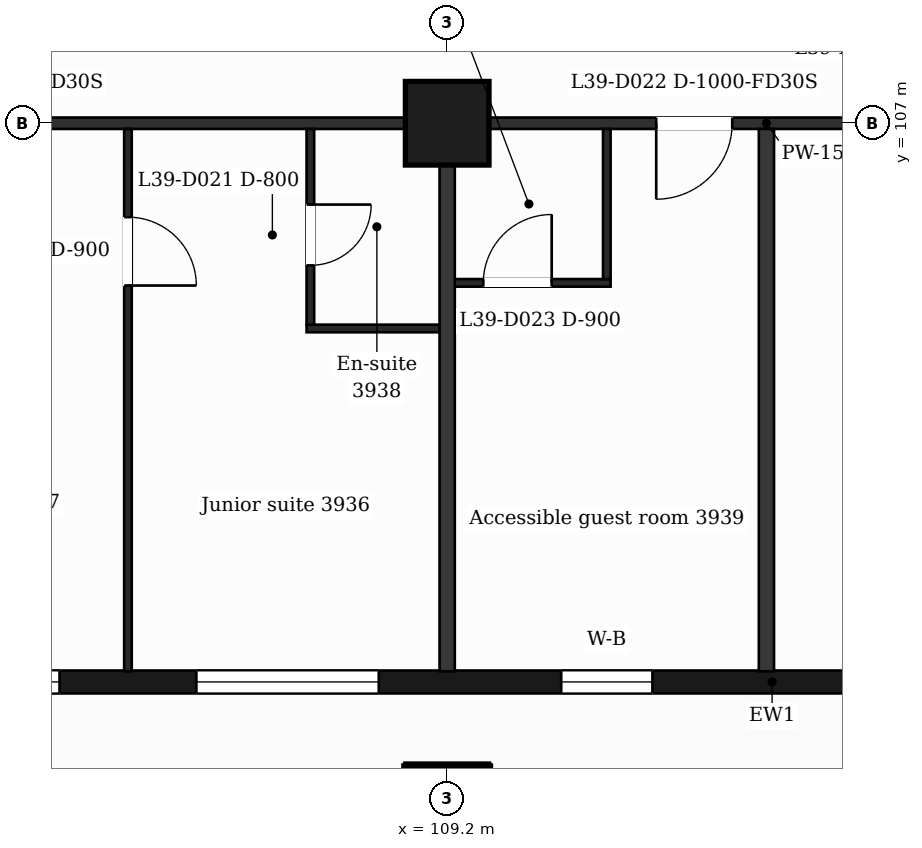
"""IFC4 building model, lengths in metres.
Left out: names, types, materials, properties, quantities, classifications, styles, units other than length and angle.
Written with IfcOpenShell. Run it as: python <this file> out.ifc"""

import sys

from ifc_helpers import new_model, si_unit, direction, frame, frame_2d, origin, origin_2d, place, context, subcontext, project, spatial, rectangle, extrude, element, fill, save


model = new_model("IFC4")
c1 = context("Model", 3, precision=1e-05, world=origin(), true_north=direction((0.0, 1.0)))
c2 = subcontext(c1, "Body", "Model", "MODEL_VIEW")
j1 = project(units=[si_unit("LENGTHUNIT", "METRE"), si_unit("PLANEANGLEUNIT", "RADIAN")], contexts=[c1])
p1 = place(None, origin())
s1 = spatial("IfcSite", under=j1, at=p1, CompositionType="ELEMENT")
p2 = place(p1, origin())
s2 = spatial("IfcBuilding", under=s1, at=p2, CompositionType="ELEMENT")
p3 = place(p2, frame((0.0, 0.0, 166.3)))
s3 = spatial("IfcBuildingStorey", under=s2, at=p3, CompositionType="ELEMENT", Elevation=166.3)
for number, where, z_axis, x_axis in (
    (1, (109.2, 98.0, 0.0), (0.0, 0.0, 1.0), (1.0, 0.0, 0.0)),
    (2, (109.2, 107.0, 0.0), (0.0, 0.0, 1.0), (1.0, 0.0, 0.0)),
):
    element("IfcColumn", number, at=place(p3, frame(where, z_axis=z_axis, x_axis=x_axis)), inside=s3, PredefinedType="COLUMN", context=c2, shape_type="SweptSolid", body=[
        extrude(rectangle(XDim=1.1, YDim=1.1, at=origin_2d()), origin(), (0.0, 0.0, 1.0), 3.7),
    ])
p4 = place(p3, frame((89.85, 99.65, 0.0), z_axis=(0.0, 0.0, 1.0), x_axis=(1.0, 0.0, 0.0)))
e3 = element("IfcWall", 3, at=p4, inside=s3, PredefinedType="SOLIDWALL", context=c2, shape_type="SweptSolid", body=[
    extrude(rectangle(XDim=47.25, YDim=0.3, at=frame_2d((23.625, 0.0))), origin(), (0.0, 0.0, 1.0), 3.38),
])
p5 = place(p4, frame((0.725, 0.0, 0.9)))
e4 = element("IfcOpeningElement", 4, at=p5, cuts=e3, PredefinedType="OPENING", context=c2, shape_type="SweptSolid", body=[
    extrude(rectangle(XDim=1.2, YDim=2.1, at=frame_2d((0.6, 1.05))), frame((0.0, 0.16, 0.0), z_axis=(0.0, -1.0, 0.0), x_axis=(1.0, 0.0, 0.0)), (0.0, 0.0, 1.0), 0.32),
])
p6 = place(p4, frame((3.45, 0.0, 0.9)))
e5 = element("IfcOpeningElement", 5, at=p6, cuts=e3, PredefinedType="OPENING", context=c2, shape_type="SweptSolid", body=[
    extrude(rectangle(XDim=2.4, YDim=2.1, at=frame_2d((1.2, 1.05))), frame((0.0, 0.16, 0.0), z_axis=(0.0, -1.0, 0.0), x_axis=(1.0, 0.0, 0.0)), (0.0, 0.0, 1.0), 0.32),
])
p7 = place(p4, frame((7.35, 0.0, 0.0)))
e6 = element("IfcOpeningElement", 6, at=p7, cuts=e3, PredefinedType="OPENING", context=c2, shape_type="SweptSolid", body=[
    extrude(rectangle(XDim=1.2, YDim=2.4, at=frame_2d((0.6, 1.2))), frame((0.0, 0.16, 0.0), z_axis=(0.0, -1.0, 0.0), x_axis=(1.0, 0.0, 0.0)), (0.0, 0.0, 1.0), 0.32),
])
p8 = place(p4, frame((9.15, 0.0, 0.9)))
e7 = element("IfcOpeningElement", 7, at=p8, cuts=e3, PredefinedType="OPENING", context=c2, shape_type="SweptSolid", body=[
    extrude(rectangle(XDim=1.2, YDim=2.1, at=frame_2d((0.6, 1.05))), frame((0.0, 0.16, 0.0), z_axis=(0.0, -1.0, 0.0), x_axis=(1.0, 0.0, 0.0)), (0.0, 0.0, 1.0), 0.32),
])
p9 = place(p4, frame((11.85, 0.0, 0.9)))
e8 = element("IfcOpeningElement", 8, at=p9, cuts=e3, PredefinedType="OPENING", context=c2, shape_type="SweptSolid", body=[
    extrude(rectangle(XDim=2.4, YDim=2.1, at=frame_2d((1.2, 1.05))), frame((0.0, 0.16, 0.0), z_axis=(0.0, -1.0, 0.0), x_axis=(1.0, 0.0, 0.0)), (0.0, 0.0, 1.0), 0.32),
])
p10 = place(p4, frame((16.05, 0.0, 0.9)))
e9 = element("IfcOpeningElement", 9, at=p10, cuts=e3, PredefinedType="OPENING", context=c2, shape_type="SweptSolid", body=[
    extrude(rectangle(XDim=2.4, YDim=2.1, at=frame_2d((1.2, 1.05))), frame((0.0, 0.16, 0.0), z_axis=(0.0, -1.0, 0.0), x_axis=(1.0, 0.0, 0.0)), (0.0, 0.0, 1.0), 0.32),
])
p11 = place(p4, frame((20.85, 0.0, 0.9)))
e10 = element("IfcOpeningElement", 10, at=p11, cuts=e3, PredefinedType="OPENING", context=c2, shape_type="SweptSolid", body=[
    extrude(rectangle(XDim=1.2, YDim=2.1, at=frame_2d((0.6, 1.05))), frame((0.0, 0.16, 0.0), z_axis=(0.0, -1.0, 0.0), x_axis=(1.0, 0.0, 0.0)), (0.0, 0.0, 1.0), 0.32),
])
p12 = place(p4, frame((25.05, 0.0, 0.9)))
e11 = element("IfcOpeningElement", 11, at=p12, cuts=e3, PredefinedType="OPENING", context=c2, shape_type="SweptSolid", body=[
    extrude(rectangle(XDim=1.2, YDim=2.1, at=frame_2d((0.6, 1.05))), frame((0.0, 0.16, 0.0), z_axis=(0.0, -1.0, 0.0), x_axis=(1.0, 0.0, 0.0)), (0.0, 0.0, 1.0), 0.32),
])
p13 = place(p4, frame((28.65, 0.0, 0.9)))
e12 = element("IfcOpeningElement", 12, at=p13, cuts=e3, PredefinedType="OPENING", context=c2, shape_type="SweptSolid", body=[
    extrude(rectangle(XDim=2.4, YDim=2.1, at=frame_2d((1.2, 1.05))), frame((0.0, 0.16, 0.0), z_axis=(0.0, -1.0, 0.0), x_axis=(1.0, 0.0, 0.0)), (0.0, 0.0, 1.0), 0.32),
])
p14 = place(p4, frame((32.85, 0.0, 0.9)))
e13 = element("IfcOpeningElement", 13, at=p14, cuts=e3, PredefinedType="OPENING", context=c2, shape_type="SweptSolid", body=[
    extrude(rectangle(XDim=2.4, YDim=2.1, at=frame_2d((1.2, 1.05))), frame((0.0, 0.16, 0.0), z_axis=(0.0, -1.0, 0.0), x_axis=(1.0, 0.0, 0.0)), (0.0, 0.0, 1.0), 0.32),
])
p15 = place(p4, frame((37.05, 0.0, 0.9)))
e14 = element("IfcOpeningElement", 14, at=p15, cuts=e3, PredefinedType="OPENING", context=c2, shape_type="SweptSolid", body=[
    extrude(rectangle(XDim=2.4, YDim=2.1, at=frame_2d((1.2, 1.05))), frame((0.0, 0.16, 0.0), z_axis=(0.0, -1.0, 0.0), x_axis=(1.0, 0.0, 0.0)), (0.0, 0.0, 1.0), 0.32),
])
p16 = place(p4, frame((41.25, 0.0, 0.9)))
e15 = element("IfcOpeningElement", 15, at=p16, cuts=e3, PredefinedType="OPENING", context=c2, shape_type="SweptSolid", body=[
    extrude(rectangle(XDim=2.4, YDim=2.1, at=frame_2d((1.2, 1.05))), frame((0.0, 0.16, 0.0), z_axis=(0.0, -1.0, 0.0), x_axis=(1.0, 0.0, 0.0)), (0.0, 0.0, 1.0), 0.32),
])
p17 = place(p4, frame((45.25, 0.0, 0.9)))
e16 = element("IfcOpeningElement", 16, at=p17, cuts=e3, PredefinedType="OPENING", context=c2, shape_type="SweptSolid", body=[
    extrude(rectangle(XDim=1.2, YDim=2.1, at=frame_2d((0.6, 1.05))), frame((0.0, 0.16, 0.0), z_axis=(0.0, -1.0, 0.0), x_axis=(1.0, 0.0, 0.0)), (0.0, 0.0, 1.0), 0.32),
])
p18 = place(p3, frame((107.35, 104.3, 0.0), z_axis=(0.0, 0.0, 1.0), x_axis=(1.0, 0.0, 0.0)))
e17 = element("IfcWall", 17, at=p18, inside=s3, PredefinedType="PARTITIONING", context=c2, shape_type="SweptSolid", body=[
    extrude(rectangle(XDim=1.85, YDim=0.1, at=frame_2d((0.925, 0.0))), origin(), (0.0, 0.0, 1.0), 3.38),
])
p19 = place(p3, frame((109.2, 104.9, 0.0), z_axis=(0.0, 0.0, 1.0), x_axis=(1.0, 0.0, 0.0)))
e18 = element("IfcWall", 18, at=p19, inside=s3, PredefinedType="PARTITIONING", context=c2, shape_type="SweptSolid", body=[
    extrude(rectangle(XDim=2.15, YDim=0.1, at=frame_2d((1.075, 0.0))), origin(), (0.0, 0.0, 1.0), 3.38),
])
p20 = place(p19, frame((0.475, 0.0, 0.0)))
e19 = element("IfcOpeningElement", 19, at=p20, cuts=e18, PredefinedType="OPENING", context=c2, shape_type="SweptSolid", body=[
    extrude(rectangle(XDim=0.9, YDim=2.1, at=frame_2d((0.45, 1.05))), frame((0.0, 0.06, 0.0), z_axis=(0.0, -1.0, 0.0), x_axis=(1.0, 0.0, 0.0)), (0.0, 0.0, 1.0), 0.12),
])
p21 = place(p3, frame((87.018, 107.0, 0.0), z_axis=(0.0, 0.0, 1.0), x_axis=(1.0, 0.0, 0.0)))
e20 = element("IfcWall", 20, at=p21, inside=s3, PredefinedType="PARTITIONING", context=c2, shape_type="SweptSolid", body=[
    extrude(rectangle(XDim=52.765, YDim=0.15, at=frame_2d((26.382, 0.0))), origin(), (0.0, 0.0, 1.0), 3.38),
])
p22 = place(p21, frame((0.463, 0.0, 0.0)))
e21 = element("IfcOpeningElement", 21, at=p22, cuts=e20, PredefinedType="OPENING", context=c2, shape_type="SweptSolid", body=[
    extrude(rectangle(XDim=0.95, YDim=2.1, at=frame_2d((0.475, 1.05))), frame((0.0, 0.085, 0.0), z_axis=(0.0, -1.0, 0.0), x_axis=(1.0, 0.0, 0.0)), (0.0, 0.0, 1.0), 0.17),
])
p23 = place(p21, frame((6.369, 0.0, 0.0)))
e22 = element("IfcOpeningElement", 22, at=p23, cuts=e20, PredefinedType="OPENING", context=c2, shape_type="SweptSolid", body=[
    extrude(rectangle(XDim=0.95, YDim=2.1, at=frame_2d((0.475, 1.05))), frame((0.0, 0.085, 0.0), z_axis=(0.0, -1.0, 0.0), x_axis=(1.0, 0.0, 0.0)), (0.0, 0.0, 1.0), 0.17),
])
p24 = place(p21, frame((9.857, 0.0, 0.0)))
e23 = element("IfcOpeningElement", 23, at=p24, cuts=e20, PredefinedType="OPENING", context=c2, shape_type="SweptSolid", body=[
    extrude(rectangle(XDim=0.95, YDim=2.1, at=frame_2d((0.475, 1.05))), frame((0.0, 0.085, 0.0), z_axis=(0.0, -1.0, 0.0), x_axis=(1.0, 0.0, 0.0)), (0.0, 0.0, 1.0), 0.17),
])
p25 = place(p21, frame((15.382, 0.0, 0.0)))
e24 = element("IfcOpeningElement", 24, at=p25, cuts=e20, PredefinedType="OPENING", context=c2, shape_type="SweptSolid", body=[
    extrude(rectangle(XDim=1.0, YDim=2.1, at=frame_2d((0.5, 1.05))), frame((0.0, 0.085, 0.0), z_axis=(0.0, -1.0, 0.0), x_axis=(1.0, 0.0, 0.0)), (0.0, 0.0, 1.0), 0.17),
])
p26 = place(p21, frame((24.932, 0.0, 0.0)))
e25 = element("IfcOpeningElement", 25, at=p26, cuts=e20, PredefinedType="OPENING", context=c2, shape_type="SweptSolid", body=[
    extrude(rectangle(XDim=1.0, YDim=2.1, at=frame_2d((0.5, 1.05))), frame((0.0, 0.085, 0.0), z_axis=(0.0, -1.0, 0.0), x_axis=(1.0, 0.0, 0.0)), (0.0, 0.0, 1.0), 0.17),
])
p27 = place(p21, frame((27.819, 0.0, 0.0)))
e26 = element("IfcOpeningElement", 26, at=p27, cuts=e20, PredefinedType="OPENING", context=c2, shape_type="SweptSolid", body=[
    extrude(rectangle(XDim=0.95, YDim=2.1, at=frame_2d((0.475, 1.05))), frame((0.0, 0.085, 0.0), z_axis=(0.0, -1.0, 0.0), x_axis=(1.0, 0.0, 0.0)), (0.0, 0.0, 1.0), 0.17),
])
p28 = place(p21, frame((42.012, 0.0, 0.0)))
e27 = element("IfcOpeningElement", 27, at=p28, cuts=e20, PredefinedType="OPENING", context=c2, shape_type="SweptSolid", body=[
    extrude(rectangle(XDim=1.0, YDim=2.1, at=frame_2d((0.5, 1.05))), frame((0.0, 0.085, 0.0), z_axis=(0.0, -1.0, 0.0), x_axis=(1.0, 0.0, 0.0)), (0.0, 0.0, 1.0), 0.17),
])
p29 = place(p21, frame((48.249, 0.0, 0.0)))
e28 = element("IfcOpeningElement", 28, at=p29, cuts=e20, PredefinedType="OPENING", context=c2, shape_type="SweptSolid", body=[
    extrude(rectangle(XDim=0.95, YDim=2.1, at=frame_2d((0.475, 1.05))), frame((0.0, 0.085, 0.0), z_axis=(0.0, -1.0, 0.0), x_axis=(1.0, 0.0, 0.0)), (0.0, 0.0, 1.0), 0.17),
])
p30 = place(p3, frame((105.0, 99.79, 0.0), z_axis=(0.0, 0.0, 1.0), x_axis=(0.0, 1.0, 0.0)))
e29 = element("IfcWall", 29, at=p30, inside=s3, PredefinedType="PARTITIONING", context=c2, shape_type="SweptSolid", body=[
    extrude(rectangle(XDim=7.135, YDim=0.1, at=frame_2d((3.567, 0.0))), origin(), (0.0, 0.0, 1.0), 3.38),
])
p31 = place(p30, frame((5.075, 0.0, 0.0)))
e30 = element("IfcOpeningElement", 30, at=p31, cuts=e29, PredefinedType="OPENING", context=c2, shape_type="SweptSolid", body=[
    extrude(rectangle(XDim=0.9, YDim=2.1, at=frame_2d((0.45, 1.05))), frame((0.0, 0.06, 0.0), z_axis=(0.0, -1.0, 0.0), x_axis=(1.0, 0.0, 0.0)), (0.0, 0.0, 1.0), 0.12),
])
p32 = place(p3, frame((107.4, 104.35, 0.0), z_axis=(0.0, 0.0, 1.0), x_axis=(0.0, 1.0, 0.0)))
e31 = element("IfcWall", 31, at=p32, inside=s3, PredefinedType="PARTITIONING", context=c2, shape_type="SweptSolid", body=[
    extrude(rectangle(XDim=2.575, YDim=0.1, at=frame_2d((1.288, 0.0))), origin(), (0.0, 0.0, 1.0), 3.38),
])
p33 = place(p32, frame((0.78, 0.0, 0.0)))
e32 = element("IfcOpeningElement", 32, at=p33, cuts=e31, PredefinedType="OPENING", context=c2, shape_type="SweptSolid", body=[
    extrude(rectangle(XDim=0.8, YDim=2.1, at=frame_2d((0.4, 1.05))), frame((0.0, 0.06, 0.0), z_axis=(0.0, -1.0, 0.0), x_axis=(1.0, 0.0, 0.0)), (0.0, 0.0, 1.0), 0.12),
])
p34 = place(p3, frame((109.2, 99.79, 0.0), z_axis=(0.0, 0.0, 1.0), x_axis=(0.0, 1.0, 0.0)))
e33 = element("IfcWall", 33, at=p34, inside=s3, PredefinedType="PARTITIONING", context=c2, shape_type="SweptSolid", body=[
    extrude(rectangle(XDim=7.135, YDim=0.2, at=frame_2d((3.567, 0.0))), origin(), (0.0, 0.0, 1.0), 3.38),
])
p35 = place(p3, frame((111.3, 104.95, 0.0), z_axis=(0.0, 0.0, 1.0), x_axis=(0.0, 1.0, 0.0)))
e34 = element("IfcWall", 34, at=p35, inside=s3, PredefinedType="PARTITIONING", context=c2, shape_type="SweptSolid", body=[
    extrude(rectangle(XDim=1.975, YDim=0.1, at=frame_2d((0.988, 0.0))), origin(), (0.0, 0.0, 1.0), 3.38),
])
p36 = place(p3, frame((113.4, 99.79, 0.0), z_axis=(0.0, 0.0, 1.0), x_axis=(0.0, 1.0, 0.0)))
e35 = element("IfcWall", 35, at=p36, inside=s3, PredefinedType="PARTITIONING", context=c2, shape_type="SweptSolid", body=[
    extrude(rectangle(XDim=7.135, YDim=0.2, at=frame_2d((3.567, 0.0))), origin(), (0.0, 0.0, 1.0), 3.38),
])
p37 = place(p9, origin())
e36 = element("IfcWindow", 36, at=p37, inside=s3, PartitioningType="SINGLE_PANEL", PredefinedType="WINDOW", context=c2, shape_type="SweptSolid", body=[
    extrude(rectangle(XDim=2.4, YDim=2.1, at=frame_2d((1.2, 1.05))), frame((0.0, 0.03, 0.0), z_axis=(0.0, -1.0, 0.0), x_axis=(1.0, 0.0, 0.0)), (0.0, 0.0, 1.0), 0.06),
])
fill(e8, e36)
p38 = place(p10, origin())
e37 = element("IfcWindow", 37, at=p38, inside=s3, PartitioningType="SINGLE_PANEL", PredefinedType="WINDOW", context=c2, shape_type="SweptSolid", body=[
    extrude(rectangle(XDim=2.4, YDim=2.1, at=frame_2d((1.2, 1.05))), frame((0.0, 0.03, 0.0), z_axis=(0.0, -1.0, 0.0), x_axis=(1.0, 0.0, 0.0)), (0.0, 0.0, 1.0), 0.06),
])
fill(e9, e37)
p39 = place(p11, origin())
e38 = element("IfcWindow", 38, at=p39, inside=s3, PartitioningType="SINGLE_PANEL", PredefinedType="WINDOW", context=c2, shape_type="SweptSolid", body=[
    extrude(rectangle(XDim=1.2, YDim=2.1, at=frame_2d((0.6, 1.05))), frame((0.0, 0.03, 0.0), z_axis=(0.0, -1.0, 0.0), x_axis=(1.0, 0.0, 0.0)), (0.0, 0.0, 1.0), 0.06),
])
fill(e10, e38)
p40 = place(p31, origin())
e39 = element("IfcDoor", 39, at=p40, inside=s3, OperationType="SINGLE_SWING_LEFT", PredefinedType="DOOR", context=c2, shape_type="SweptSolid", body=[
    extrude(rectangle(XDim=0.9, YDim=2.1, at=frame_2d((0.45, 1.05))), frame((0.0, 0.025, 0.0), z_axis=(0.0, -1.0, 0.0), x_axis=(1.0, 0.0, 0.0)), (0.0, 0.0, 1.0), 0.05),
])
fill(e30, e39)
p41 = place(p33, origin())
e40 = element("IfcDoor", 40, at=p41, inside=s3, OperationType="SINGLE_SWING_RIGHT", PredefinedType="DOOR", context=c2, shape_type="SweptSolid", body=[
    extrude(rectangle(XDim=0.8, YDim=2.1, at=frame_2d((0.4, 1.05))), frame((0.0, 0.025, 0.0), z_axis=(0.0, -1.0, 0.0), x_axis=(1.0, 0.0, 0.0)), (0.0, 0.0, 1.0), 0.05),
])
fill(e32, e40)
p42 = place(p26, origin())
e41 = element("IfcDoor", 41, at=p42, inside=s3, OperationType="SINGLE_SWING_LEFT", PredefinedType="DOOR", context=c2, shape_type="SweptSolid", body=[
    extrude(rectangle(XDim=1.0, YDim=2.1, at=frame_2d((0.5, 1.05))), frame((0.0, 0.025, 0.0), z_axis=(0.0, -1.0, 0.0), x_axis=(1.0, 0.0, 0.0)), (0.0, 0.0, 1.0), 0.05),
])
fill(e25, e41)
p43 = place(p20, origin())
e42 = element("IfcDoor", 42, at=p43, inside=s3, OperationType="SINGLE_SWING_RIGHT", PredefinedType="DOOR", context=c2, shape_type="SweptSolid", body=[
    extrude(rectangle(XDim=0.9, YDim=2.1, at=frame_2d((0.45, 1.05))), frame((0.0, 0.025, 0.0), z_axis=(0.0, -1.0, 0.0), x_axis=(1.0, 0.0, 0.0)), (0.0, 0.0, 1.0), 0.05),
])
fill(e19, e42)
save(model, sys.argv[1])
